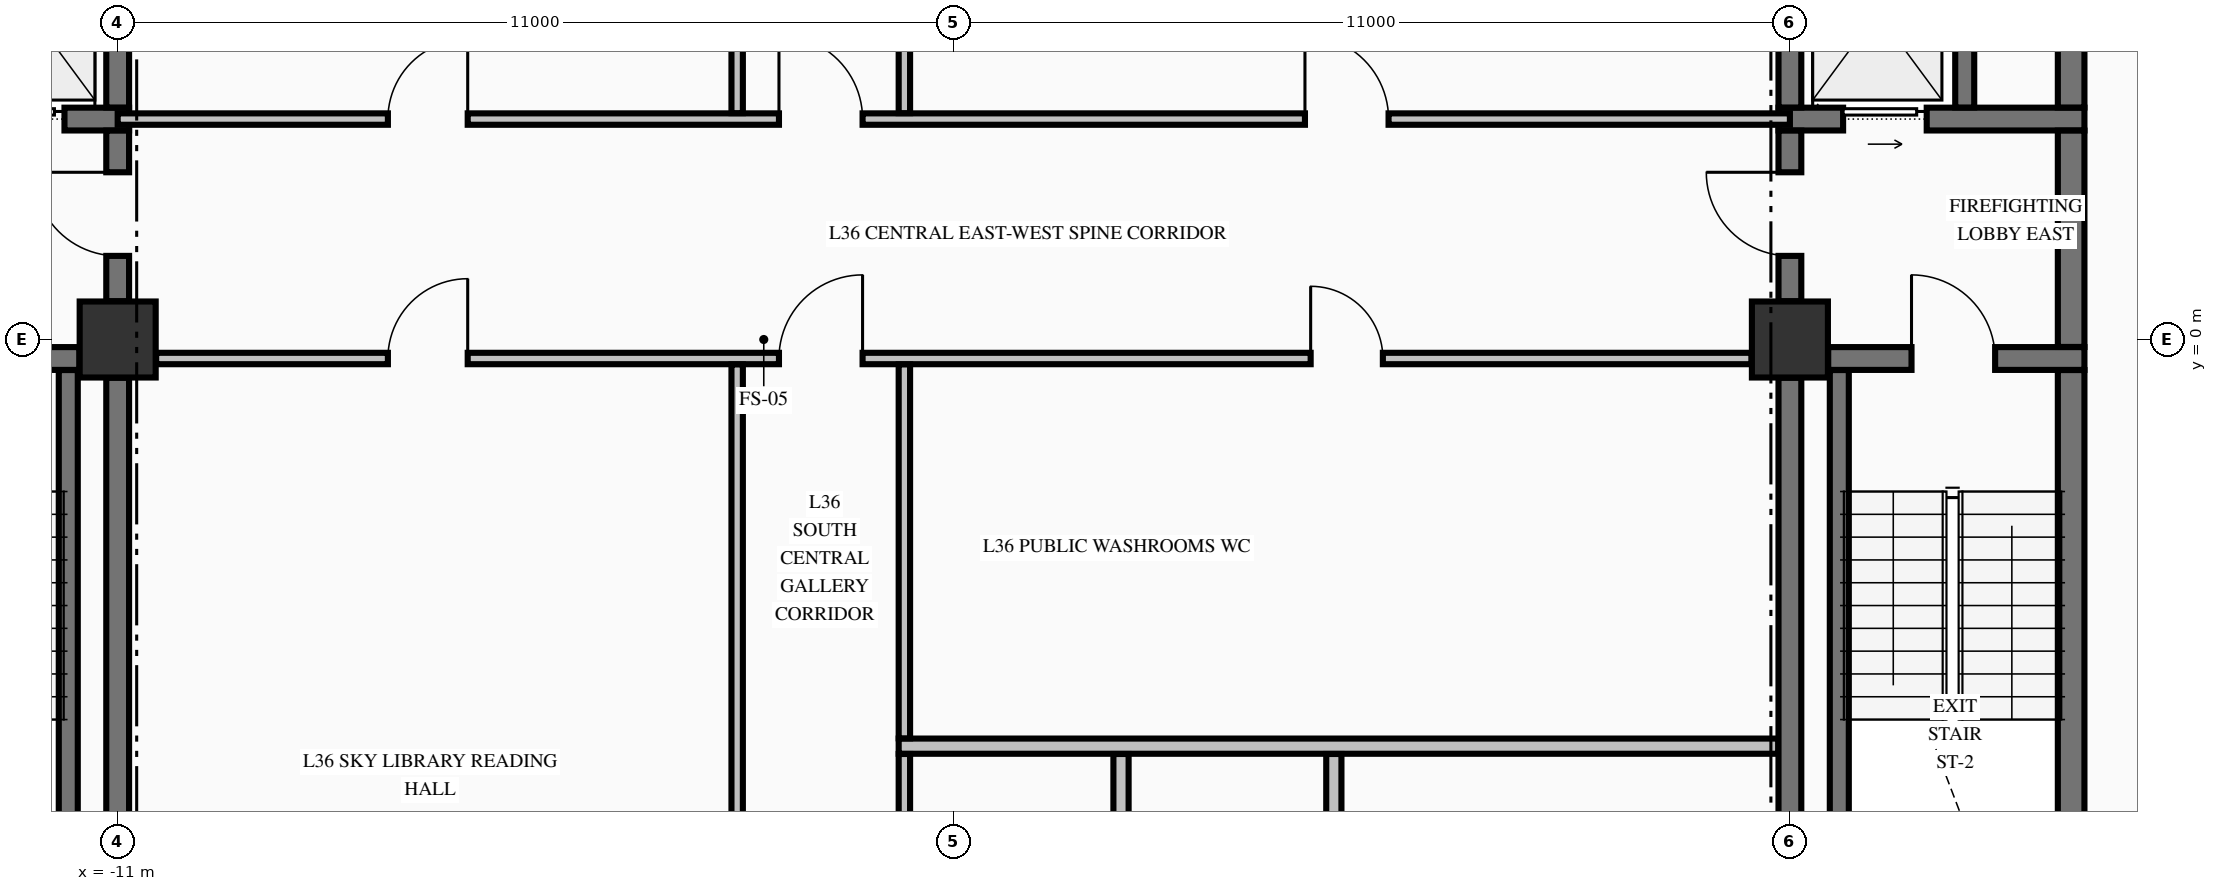
"""IFC4 building model, lengths in metres.
Left out: names, types, materials, properties, quantities, classifications, styles, units other than length and angle.
Written with IfcOpenShell. Run it as: python <this file> out.ifc"""

import sys

from ifc_helpers import new_model, si_unit, direction, frame, frame_2d, origin, origin_2d, place, context, subcontext, project, spatial, rectangle, extrude, element, fill, save


model = new_model("IFC4")
c1 = context("Model", 3, precision=1e-05, world=origin(), true_north=direction((0.0, 1.0)))
c2 = subcontext(c1, "Body", "Model", "MODEL_VIEW")
j1 = project(units=[si_unit("LENGTHUNIT", "METRE"), si_unit("PLANEANGLEUNIT", "RADIAN")], contexts=[c1])
p1 = place(None, origin())
s1 = spatial("IfcSite", under=j1, at=p1, CompositionType="ELEMENT")
p2 = place(p1, origin())
s2 = spatial("IfcBuilding", under=s1, at=p2, CompositionType="ELEMENT")
p3 = place(p2, frame((0.0, 0.0, 142.77)))
s3 = spatial("IfcBuildingStorey", under=s2, at=p3, CompositionType="ELEMENT", Elevation=142.77)
for number, where, z_axis, x_axis in (
    (1, (-11.0, 0.0, -0.325), (0.0, 0.0, 1.0), (1.0, 0.0, 0.0)),
    (2, (11.0, 0.0, -0.325), (0.0, 0.0, 1.0), (1.0, 0.0, 0.0)),
):
    element("IfcColumn", number, at=place(p3, frame(where, z_axis=z_axis, x_axis=x_axis)), inside=s3, PredefinedType="COLUMN", context=c2, shape_type="SweptSolid", body=[
        extrude(rectangle(XDim=1.0, YDim=1.0, at=origin_2d()), origin(), (0.0, 0.0, 1.0), 3.645),
    ])
p4 = place(p3, frame((-19.496, -0.25, 0.0), z_axis=(0.0, 0.0, 1.0), x_axis=(1.0, 0.0, 0.0)))
e3 = element("IfcWall", 3, at=p4, inside=s3, PredefinedType="SHEAR", context=c2, shape_type="SweptSolid", body=[
    extrude(rectangle(XDim=7.992, YDim=0.3, at=frame_2d((3.996, 0.0))), origin(), (0.0, 0.0, 1.0), 3.32),
])
p5 = place(p4, frame((5.796, 0.0, 0.0)))
e4 = element("IfcOpeningElement", 4, at=p5, cuts=e3, PredefinedType="OPENING", context=c2, shape_type="SweptSolid", body=[
    extrude(rectangle(XDim=1.1, YDim=2.15, at=frame_2d((0.55, 1.075))), frame((0.0, 0.16, 0.0), z_axis=(0.0, -1.0, 0.0), x_axis=(1.0, 0.0, 0.0)), (0.0, 0.0, 1.0), 0.32),
])
p6 = place(p3, frame((11.504, -0.25, 0.0), z_axis=(0.0, 0.0, 1.0), x_axis=(1.0, 0.0, 0.0)))
e5 = element("IfcWall", 5, at=p6, inside=s3, PredefinedType="SHEAR", context=c2, shape_type="SweptSolid", body=[
    extrude(rectangle(XDim=3.371, YDim=0.3, at=frame_2d((1.686, 0.0))), origin(), (0.0, 0.0, 1.0), 3.32),
])
p7 = place(p6, frame((1.096, 0.0, 0.0)))
e6 = element("IfcOpeningElement", 6, at=p7, cuts=e5, PredefinedType="OPENING", context=c2, shape_type="SweptSolid", body=[
    extrude(rectangle(XDim=1.1, YDim=2.15, at=frame_2d((0.55, 1.075))), frame((0.0, 0.16, 0.0), z_axis=(0.0, -1.0, 0.0), x_axis=(1.0, 0.0, 0.0)), (0.0, 0.0, 1.0), 0.32),
])
p8 = place(p3, frame((-14.875, 2.9, 0.0), z_axis=(0.0, 0.0, 1.0), x_axis=(1.0, 0.0, 0.0)))
e7 = element("IfcWall", 7, at=p8, inside=s3, PredefinedType="SHEAR", context=c2, shape_type="SweptSolid", body=[
    extrude(rectangle(XDim=4.025, YDim=0.3, at=frame_2d((2.012, 0.0))), origin(), (0.0, 0.0, 1.0), 3.32),
])
p9 = place(p8, frame((2.075, 0.0, 0.0)))
e8 = element("IfcOpeningElement", 8, at=p9, cuts=e7, PredefinedType="OPENING", context=c2, shape_type="SweptSolid", body=[
    extrude(rectangle(XDim=1.1, YDim=2.2, at=frame_2d((0.55, 1.1))), frame((0.0, 0.16, 0.0), z_axis=(0.0, -1.0, 0.0), x_axis=(1.0, 0.0, 0.0)), (0.0, 0.0, 1.0), 0.32),
])
p10 = place(p3, frame((10.85, 2.9, 0.0), z_axis=(0.0, 0.0, 1.0), x_axis=(1.0, 0.0, 0.0)))
e9 = element("IfcWall", 9, at=p10, inside=s3, PredefinedType="SHEAR", context=c2, shape_type="SweptSolid", body=[
    extrude(rectangle(XDim=4.025, YDim=0.3, at=frame_2d((2.012, 0.0))), origin(), (0.0, 0.0, 1.0), 3.32),
])
p11 = place(p10, frame((0.85, 0.0, 0.0)))
e10 = element("IfcOpeningElement", 10, at=p11, cuts=e9, PredefinedType="OPENING", context=c2, shape_type="SweptSolid", body=[
    extrude(rectangle(XDim=1.1, YDim=2.2, at=frame_2d((0.55, 1.1))), frame((0.0, 0.16, 0.0), z_axis=(0.0, -1.0, 0.0), x_axis=(1.0, 0.0, 0.0)), (0.0, 0.0, 1.0), 0.32),
])
p12 = place(p3, frame((-0.725, -5.35, 0.0), z_axis=(0.0, 0.0, 1.0), x_axis=(1.0, 0.0, 0.0)))
e11 = element("IfcWall", 11, at=p12, inside=s3, PredefinedType="PARTITIONING", context=c2, shape_type="SweptSolid", body=[
    extrude(rectangle(XDim=11.572, YDim=0.2, at=frame_2d((5.786, 0.0))), origin(), (0.0, 0.0, 1.0), 3.32),
])
p13 = place(p3, frame((-10.494, -0.25, 0.0), z_axis=(0.0, 0.0, 1.0), x_axis=(1.0, 0.0, 0.0)))
e12 = element("IfcWall", 12, at=p13, inside=s3, PredefinedType="PARTITIONING", context=c2, shape_type="SweptSolid", body=[
    extrude(rectangle(XDim=20.988, YDim=0.15, at=frame_2d((10.494, 0.0))), origin(), (0.0, 0.0, 1.0), 3.32),
])
p14 = place(p13, frame((8.194, 0.0, 0.0)))
e13 = element("IfcOpeningElement", 13, at=p14, cuts=e12, PredefinedType="OPENING", context=c2, shape_type="SweptSolid", body=[
    extrude(rectangle(XDim=1.1, YDim=2.15, at=frame_2d((0.55, 1.075))), frame((0.0, 0.085, 0.0), z_axis=(0.0, -1.0, 0.0), x_axis=(1.0, 0.0, 0.0)), (0.0, 0.0, 1.0), 0.17),
])
p15 = place(p13, frame((3.049, 0.0, 0.0)))
e14 = element("IfcOpeningElement", 14, at=p15, cuts=e12, PredefinedType="OPENING", context=c2, shape_type="SweptSolid", body=[
    extrude(rectangle(XDim=1.05, YDim=2.15, at=frame_2d((0.525, 1.075))), frame((0.0, 0.085, 0.0), z_axis=(0.0, -1.0, 0.0), x_axis=(1.0, 0.0, 0.0)), (0.0, 0.0, 1.0), 0.17),
])
p16 = place(p13, frame((15.189, 0.0, 0.0)))
e15 = element("IfcOpeningElement", 15, at=p16, cuts=e12, PredefinedType="OPENING", context=c2, shape_type="SweptSolid", body=[
    extrude(rectangle(XDim=0.95, YDim=2.15, at=frame_2d((0.475, 1.075))), frame((0.0, 0.085, 0.0), z_axis=(0.0, -1.0, 0.0), x_axis=(1.0, 0.0, 0.0)), (0.0, 0.0, 1.0), 0.17),
])
p17 = place(p3, frame((-11.0, 2.9, 0.0), z_axis=(0.0, 0.0, 1.0), x_axis=(1.0, 0.0, 0.0)))
e16 = element("IfcWall", 16, at=p17, inside=s3, PredefinedType="PARTITIONING", context=c2, shape_type="SweptSolid", body=[
    extrude(rectangle(XDim=22.0, YDim=0.15, at=frame_2d((11.0, 0.0))), origin(), (0.0, 0.0, 1.0), 3.32),
])
p18 = place(p17, frame((8.7, 0.0, 0.0)))
e17 = element("IfcOpeningElement", 17, at=p18, cuts=e16, PredefinedType="OPENING", context=c2, shape_type="SweptSolid", body=[
    extrude(rectangle(XDim=1.1, YDim=2.15, at=frame_2d((0.55, 1.075))), frame((0.0, 0.085, 0.0), z_axis=(0.0, -1.0, 0.0), x_axis=(1.0, 0.0, 0.0)), (0.0, 0.0, 1.0), 0.17),
])
p19 = place(p17, frame((3.555, 0.0, 0.0)))
e18 = element("IfcOpeningElement", 18, at=p19, cuts=e16, PredefinedType="OPENING", context=c2, shape_type="SweptSolid", body=[
    extrude(rectangle(XDim=1.05, YDim=2.15, at=frame_2d((0.525, 1.075))), frame((0.0, 0.085, 0.0), z_axis=(0.0, -1.0, 0.0), x_axis=(1.0, 0.0, 0.0)), (0.0, 0.0, 1.0), 0.17),
])
p20 = place(p17, frame((15.62, 0.0, 0.0)))
e19 = element("IfcOpeningElement", 19, at=p20, cuts=e16, PredefinedType="OPENING", context=c2, shape_type="SweptSolid", body=[
    extrude(rectangle(XDim=1.1, YDim=2.15, at=frame_2d((0.55, 1.075))), frame((0.0, 0.085, 0.0), z_axis=(0.0, -1.0, 0.0), x_axis=(1.0, 0.0, 0.0)), (0.0, 0.0, 1.0), 0.17),
])
p21 = place(p3, frame((-11.65, -9.798, 0.0), z_axis=(0.0, 0.0, 1.0), x_axis=(0.0, 1.0, 0.0)))
e20 = element("IfcWall", 20, at=p21, inside=s3, PredefinedType="SOLIDWALL", context=c2, shape_type="SweptSolid", body=[
    extrude(rectangle(XDim=9.396, YDim=0.25, at=frame_2d((4.698, 0.0))), origin(), (0.0, 0.0, 1.0), 3.32),
])
p22 = place(p3, frame((-11.0, -9.446, 0.0), z_axis=(0.0, 0.0, 1.0), x_axis=(0.0, 1.0, 0.0)))
e21 = element("IfcWall", 21, at=p22, inside=s3, PredefinedType="SHEAR", context=c2, shape_type="SweptSolid", body=[
    extrude(rectangle(XDim=8.942, YDim=0.3, at=frame_2d((4.471, 0.0))), origin(), (0.0, 0.0, 1.0), 3.32),
])
p23 = place(p3, frame((-11.0, 0.504, 0.0), z_axis=(0.0, 0.0, 1.0), x_axis=(0.0, 1.0, 0.0)))
e22 = element("IfcWall", 22, at=p23, inside=s3, PredefinedType="SHEAR", context=c2, shape_type="SweptSolid", body=[
    extrude(rectangle(XDim=2.244, YDim=0.3, at=frame_2d((1.122, 0.0))), origin(), (0.0, 0.0, 1.0), 3.32),
])
p24 = place(p23, frame((0.596, 0.0, 0.0)))
e23 = element("IfcOpeningElement", 23, at=p24, cuts=e22, PredefinedType="OPENING", context=c2, shape_type="SweptSolid", body=[
    extrude(rectangle(XDim=1.1, YDim=2.15, at=frame_2d((0.55, 1.075))), frame((0.0, 0.16, 0.0), z_axis=(0.0, -1.0, 0.0), x_axis=(1.0, 0.0, 0.0)), (0.0, 0.0, 1.0), 0.32),
])
p25 = place(p3, frame((-11.0, 3.052, 0.0), z_axis=(0.0, 0.0, 1.0), x_axis=(0.0, 1.0, 0.0)))
e24 = element("IfcWall", 24, at=p25, inside=s3, PredefinedType="SHEAR", context=c2, shape_type="SweptSolid", body=[
    extrude(rectangle(XDim=2.496, YDim=0.3, at=frame_2d((1.248, 0.0))), origin(), (0.0, 0.0, 1.0), 3.32),
])
p26 = place(p3, frame((11.0, -9.446, 0.0), z_axis=(0.0, 0.0, 1.0), x_axis=(0.0, 1.0, 0.0)))
e25 = element("IfcWall", 25, at=p26, inside=s3, PredefinedType="SHEAR", context=c2, shape_type="SweptSolid", body=[
    extrude(rectangle(XDim=8.942, YDim=0.3, at=frame_2d((4.471, 0.0))), origin(), (0.0, 0.0, 1.0), 3.32),
])
p27 = place(p3, frame((11.0, 0.504, 0.0), z_axis=(0.0, 0.0, 1.0), x_axis=(0.0, 1.0, 0.0)))
e26 = element("IfcWall", 26, at=p27, inside=s3, PredefinedType="SHEAR", context=c2, shape_type="SweptSolid", body=[
    extrude(rectangle(XDim=2.244, YDim=0.3, at=frame_2d((1.122, 0.0))), origin(), (0.0, 0.0, 1.0), 3.32),
])
p28 = place(p27, frame((0.596, 0.0, 0.0)))
e27 = element("IfcOpeningElement", 27, at=p28, cuts=e26, PredefinedType="OPENING", context=c2, shape_type="SweptSolid", body=[
    extrude(rectangle(XDim=1.1, YDim=2.15, at=frame_2d((0.55, 1.075))), frame((0.0, 0.16, 0.0), z_axis=(0.0, -1.0, 0.0), x_axis=(1.0, 0.0, 0.0)), (0.0, 0.0, 1.0), 0.32),
])
p29 = place(p3, frame((11.0, 3.052, 0.0), z_axis=(0.0, 0.0, 1.0), x_axis=(0.0, 1.0, 0.0)))
e28 = element("IfcWall", 28, at=p29, inside=s3, PredefinedType="SHEAR", context=c2, shape_type="SweptSolid", body=[
    extrude(rectangle(XDim=2.496, YDim=0.3, at=frame_2d((1.248, 0.0))), origin(), (0.0, 0.0, 1.0), 3.32),
])
p30 = place(p3, frame((11.65, -9.798, 0.0), z_axis=(0.0, 0.0, 1.0), x_axis=(0.0, 1.0, 0.0)))
e29 = element("IfcWall", 29, at=p30, inside=s3, PredefinedType="SOLIDWALL", context=c2, shape_type="SweptSolid", body=[
    extrude(rectangle(XDim=9.396, YDim=0.25, at=frame_2d((4.698, 0.0))), origin(), (0.0, 0.0, 1.0), 3.32),
])
p31 = place(p3, frame((13.3, 3.052, 0.0), z_axis=(0.0, 0.0, 1.0), x_axis=(0.0, 1.0, 0.0)))
e30 = element("IfcWall", 30, at=p31, inside=s3, PredefinedType="SOLIDWALL", context=c2, shape_type="SweptSolid", body=[
    extrude(rectangle(XDim=2.496, YDim=0.25, at=frame_2d((1.248, 0.0))), origin(), (0.0, 0.0, 1.0), 3.32),
])
p32 = place(p3, frame((14.7, -9.773, 0.0), z_axis=(0.0, 0.0, 1.0), x_axis=(0.0, 1.0, 0.0)))
e31 = element("IfcWall", 31, at=p32, inside=s3, PredefinedType="SHEAR", context=c2, shape_type="SweptSolid", body=[
    extrude(rectangle(XDim=9.371, YDim=0.35, at=frame_2d((4.686, 0.0))), origin(), (0.0, 0.0, 1.0), 3.32),
])
p33 = place(p3, frame((14.7, -0.098, 0.0), z_axis=(0.0, 0.0, 1.0), x_axis=(0.0, 1.0, 0.0)))
e32 = element("IfcWall", 32, at=p33, inside=s3, PredefinedType="SHEAR", context=c2, shape_type="SweptSolid", body=[
    extrude(rectangle(XDim=2.846, YDim=0.35, at=frame_2d((1.423, 0.0))), origin(), (0.0, 0.0, 1.0), 3.32),
])
p34 = place(p3, frame((14.7, 3.052, 0.0), z_axis=(0.0, 0.0, 1.0), x_axis=(0.0, 1.0, 0.0)))
e33 = element("IfcWall", 33, at=p34, inside=s3, PredefinedType="SHEAR", context=c2, shape_type="SweptSolid", body=[
    extrude(rectangle(XDim=2.496, YDim=0.35, at=frame_2d((1.248, 0.0))), origin(), (0.0, 0.0, 1.0), 3.32),
])
p35 = place(p3, frame((-2.85, -9.872, 0.0), z_axis=(0.0, 0.0, 1.0), x_axis=(0.0, 1.0, 0.0)))
e34 = element("IfcWall", 34, at=p35, inside=s3, PredefinedType="PARTITIONING", context=c2, shape_type="SweptSolid", body=[
    extrude(rectangle(XDim=9.544, YDim=0.15, at=frame_2d((4.772, 0.0))), origin(), (0.0, 0.0, 1.0), 3.32),
])
p36 = place(p3, frame((-2.85, 2.978, 0.0), z_axis=(0.0, 0.0, 1.0), x_axis=(0.0, 1.0, 0.0)))
e35 = element("IfcWall", 35, at=p36, inside=s3, PredefinedType="PARTITIONING", context=c2, shape_type="SweptSolid", body=[
    extrude(rectangle(XDim=7.444, YDim=0.15, at=frame_2d((3.722, 0.0))), origin(), (0.0, 0.0, 1.0), 3.32),
])
p37 = place(p3, frame((-0.65, -9.872, 0.0), z_axis=(0.0, 0.0, 1.0), x_axis=(0.0, 1.0, 0.0)))
e36 = element("IfcWall", 36, at=p37, inside=s3, PredefinedType="PARTITIONING", context=c2, shape_type="SweptSolid", body=[
    extrude(rectangle(XDim=4.419, YDim=0.15, at=frame_2d((2.209, 0.0))), origin(), (0.0, 0.0, 1.0), 3.32),
])
p38 = place(p37, frame((2.597, 0.0, 0.0)))
e37 = element("IfcOpeningElement", 37, at=p38, cuts=e36, PredefinedType="OPENING", context=c2, shape_type="SweptSolid", body=[
    extrude(rectangle(XDim=0.95, YDim=2.15, at=frame_2d((0.475, 1.075))), frame((0.0, 0.085, 0.0), z_axis=(0.0, -1.0, 0.0), x_axis=(1.0, 0.0, 0.0)), (0.0, 0.0, 1.0), 0.17),
])
p39 = place(p3, frame((-0.65, -5.247, 0.0), z_axis=(0.0, 0.0, 1.0), x_axis=(0.0, 1.0, 0.0)))
e38 = element("IfcWall", 38, at=p39, inside=s3, PredefinedType="PARTITIONING", context=c2, shape_type="SweptSolid", body=[
    extrude(rectangle(XDim=4.919, YDim=0.15, at=frame_2d((2.459, 0.0))), origin(), (0.0, 0.0, 1.0), 3.32),
])
p40 = place(p3, frame((-0.65, 2.978, 0.0), z_axis=(0.0, 0.0, 1.0), x_axis=(0.0, 1.0, 0.0)))
e39 = element("IfcWall", 39, at=p40, inside=s3, PredefinedType="PARTITIONING", context=c2, shape_type="SweptSolid", body=[
    extrude(rectangle(XDim=7.444, YDim=0.15, at=frame_2d((3.722, 0.0))), origin(), (0.0, 0.0, 1.0), 3.32),
])
for number, where, z_axis, x_axis in (
    (40, (2.2, -9.872, 0.0), (0.0, 0.0, 1.0), (0.0, 1.0, 0.0)),
    (41, (5.0, -9.872, 0.0), (0.0, 0.0, 1.0), (0.0, 1.0, 0.0)),
):
    element("IfcWall", number, at=place(p3, frame(where, z_axis=z_axis, x_axis=x_axis)), inside=s3, PredefinedType="PARTITIONING", context=c2, shape_type="SweptSolid", body=[
        extrude(rectangle(XDim=4.419, YDim=0.2, at=frame_2d((2.209, 0.0))), origin(), (0.0, 0.0, 1.0), 3.32),
    ])
p41 = place(p24, origin())
e42 = element("IfcDoor", 42, at=p41, inside=s3, OperationType="SINGLE_SWING_RIGHT", PredefinedType="DOOR", context=c2, shape_type="SweptSolid", body=[
    extrude(rectangle(XDim=1.1, YDim=2.15, at=frame_2d((0.55, 1.075))), frame((0.0, 0.025, 0.0), z_axis=(0.0, -1.0, 0.0), x_axis=(1.0, 0.0, 0.0)), (0.0, 0.0, 1.0), 0.05),
])
fill(e23, e42)
p42 = place(p9, origin())
e43 = element("IfcDoor", 43, at=p42, inside=s3, OperationType="SLIDING_TO_LEFT", PredefinedType="DOOR", context=c2, shape_type="SweptSolid", body=[
    extrude(rectangle(XDim=1.1, YDim=2.2, at=frame_2d((0.55, 1.1))), frame((0.0, 0.025, 0.0), z_axis=(0.0, -1.0, 0.0), x_axis=(1.0, 0.0, 0.0)), (0.0, 0.0, 1.0), 0.05),
])
fill(e8, e43)
p43 = place(p7, origin())
e44 = element("IfcDoor", 44, at=p43, inside=s3, OperationType="SINGLE_SWING_LEFT", PredefinedType="DOOR", context=c2, shape_type="SweptSolid", body=[
    extrude(rectangle(XDim=1.1, YDim=2.15, at=frame_2d((0.55, 1.075))), frame((0.0, 0.025, 0.0), z_axis=(0.0, -1.0, 0.0), x_axis=(1.0, 0.0, 0.0)), (0.0, 0.0, 1.0), 0.05),
])
fill(e6, e44)
p44 = place(p28, origin())
e45 = element("IfcDoor", 45, at=p44, inside=s3, OperationType="SINGLE_SWING_RIGHT", PredefinedType="DOOR", context=c2, shape_type="SweptSolid", body=[
    extrude(rectangle(XDim=1.1, YDim=2.15, at=frame_2d((0.55, 1.075))), frame((0.0, 0.025, 0.0), z_axis=(0.0, -1.0, 0.0), x_axis=(1.0, 0.0, 0.0)), (0.0, 0.0, 1.0), 0.05),
])
fill(e27, e45)
p45 = place(p11, origin())
e46 = element("IfcDoor", 46, at=p45, inside=s3, OperationType="SLIDING_TO_RIGHT", PredefinedType="DOOR", context=c2, shape_type="SweptSolid", body=[
    extrude(rectangle(XDim=1.1, YDim=2.2, at=frame_2d((0.55, 1.1))), frame((0.0, 0.025, 0.0), z_axis=(0.0, -1.0, 0.0), x_axis=(1.0, 0.0, 0.0)), (0.0, 0.0, 1.0), 0.05),
])
fill(e10, e46)
p46 = place(p18, origin())
e47 = element("IfcDoor", 47, at=p46, inside=s3, OperationType="SINGLE_SWING_LEFT", PredefinedType="DOOR", context=c2, shape_type="SweptSolid", body=[
    extrude(rectangle(XDim=1.1, YDim=2.15, at=frame_2d((0.55, 1.075))), frame((0.0, 0.025, 0.0), z_axis=(0.0, -1.0, 0.0), x_axis=(1.0, 0.0, 0.0)), (0.0, 0.0, 1.0), 0.05),
])
fill(e17, e47)
p47 = place(p14, origin())
e48 = element("IfcDoor", 48, at=p47, inside=s3, OperationType="SINGLE_SWING_RIGHT", PredefinedType="DOOR", context=c2, shape_type="SweptSolid", body=[
    extrude(rectangle(XDim=1.1, YDim=2.15, at=frame_2d((0.55, 1.075))), frame((0.0, 0.025, 0.0), z_axis=(0.0, -1.0, 0.0), x_axis=(1.0, 0.0, 0.0)), (0.0, 0.0, 1.0), 0.05),
])
fill(e13, e48)
p48 = place(p19, origin())
e49 = element("IfcDoor", 49, at=p48, inside=s3, OperationType="SINGLE_SWING_RIGHT", PredefinedType="DOOR", context=c2, shape_type="SweptSolid", body=[
    extrude(rectangle(XDim=1.05, YDim=2.15, at=frame_2d((0.525, 1.075))), frame((0.0, 0.025, 0.0), z_axis=(0.0, -1.0, 0.0), x_axis=(1.0, 0.0, 0.0)), (0.0, 0.0, 1.0), 0.05),
])
fill(e18, e49)
p49 = place(p20, origin())
e50 = element("IfcDoor", 50, at=p49, inside=s3, OperationType="SINGLE_SWING_LEFT", PredefinedType="DOOR", context=c2, shape_type="SweptSolid", body=[
    extrude(rectangle(XDim=1.1, YDim=2.15, at=frame_2d((0.55, 1.075))), frame((0.0, 0.025, 0.0), z_axis=(0.0, -1.0, 0.0), x_axis=(1.0, 0.0, 0.0)), (0.0, 0.0, 1.0), 0.05),
])
fill(e19, e50)
p50 = place(p15, origin())
e51 = element("IfcDoor", 51, at=p50, inside=s3, OperationType="SINGLE_SWING_RIGHT", PredefinedType="DOOR", context=c2, shape_type="SweptSolid", body=[
    extrude(rectangle(XDim=1.05, YDim=2.15, at=frame_2d((0.525, 1.075))), frame((0.0, 0.025, 0.0), z_axis=(0.0, -1.0, 0.0), x_axis=(1.0, 0.0, 0.0)), (0.0, 0.0, 1.0), 0.05),
])
fill(e14, e51)
p51 = place(p16, origin())
e52 = element("IfcDoor", 52, at=p51, inside=s3, OperationType="SINGLE_SWING_LEFT", PredefinedType="DOOR", context=c2, shape_type="SweptSolid", body=[
    extrude(rectangle(XDim=0.95, YDim=2.15, at=frame_2d((0.475, 1.075))), frame((0.0, 0.025, 0.0), z_axis=(0.0, -1.0, 0.0), x_axis=(1.0, 0.0, 0.0)), (0.0, 0.0, 1.0), 0.05),
])
fill(e15, e52)
save(model, sys.argv[1])
